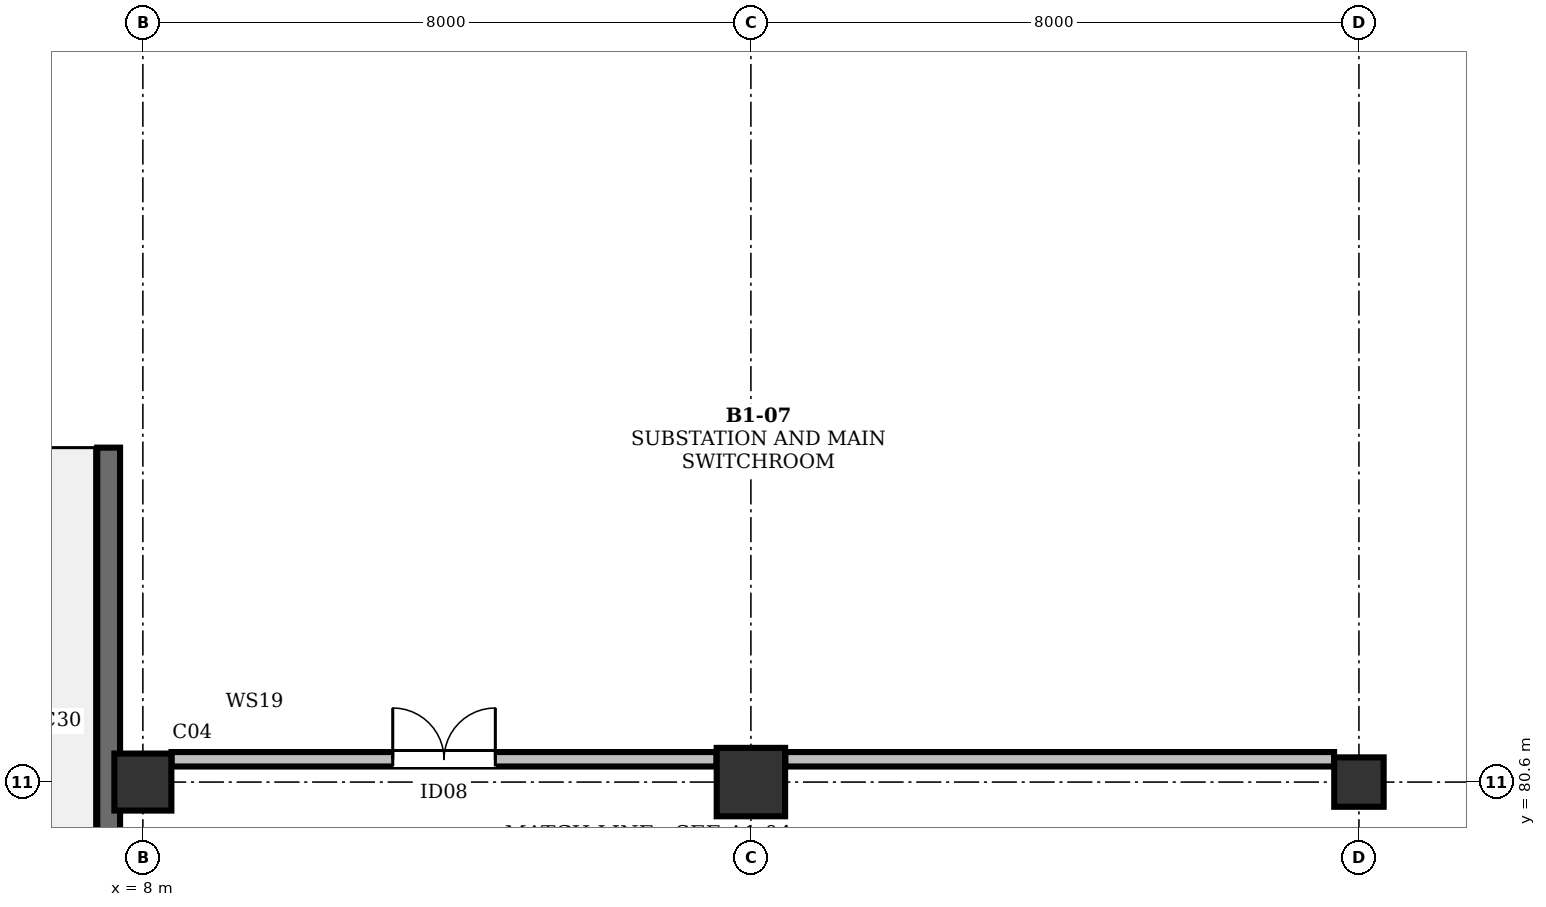
"""IFC4 building model, lengths in metres.
Left out: names, types, materials, properties, quantities, classifications, styles, units other than length and angle.
Written with IfcOpenShell. Run it as: python <this file> out.ifc"""

import sys

from ifc_helpers import new_model, si_unit, direction, frame, frame_2d, origin, origin_2d, place, context, subcontext, project, spatial, rectangle, extrude, element, fill, save


model = new_model("IFC4")
c1 = context("Model", 3, precision=1e-05, world=origin(), true_north=direction((0.0, 1.0)))
c2 = subcontext(c1, "Body", "Model", "MODEL_VIEW")
j1 = project(units=[si_unit("LENGTHUNIT", "METRE"), si_unit("PLANEANGLEUNIT", "RADIAN")], contexts=[c1])
p1 = place(None, origin())
s1 = spatial("IfcSite", under=j1, at=p1, CompositionType="ELEMENT")
p2 = place(p1, origin())
s2 = spatial("IfcBuilding", under=s1, at=p2, CompositionType="ELEMENT")
p3 = place(p2, frame((0.0, 0.0, -4.8)))
s3 = spatial("IfcBuildingStorey", under=s2, at=p3, CompositionType="ELEMENT", Elevation=-4.8)
p4 = place(p3, frame((8.0, 80.6, 0.0), z_axis=(0.0, 0.0, 1.0), x_axis=(1.0, 0.0, 0.0)))
e1 = element("IfcColumn", 1, at=p4, inside=s3, PredefinedType="COLUMN", context=c2, shape_type="SweptSolid", body=[
    extrude(rectangle(XDim=0.75, YDim=0.75, at=origin_2d()), origin(), (0.0, 0.0, 1.0), 4.8),
])
p5 = place(p3, frame((16.0, 80.6, 0.0), z_axis=(0.0, 0.0, 1.0), x_axis=(1.0, 0.0, 0.0)))
e2 = element("IfcColumn", 2, at=p5, inside=s3, PredefinedType="COLUMN", context=c2, shape_type="SweptSolid", body=[
    extrude(rectangle(XDim=0.9, YDim=0.9, at=origin_2d()), origin(), (0.0, 0.0, 1.0), 4.8),
])
p6 = place(p3, frame((24.0, 80.6, 0.0), z_axis=(0.0, 0.0, 1.0), x_axis=(1.0, 0.0, 0.0)))
e3 = element("IfcColumn", 3, at=p6, inside=s3, PredefinedType="COLUMN", context=c2, shape_type="SweptSolid", body=[
    extrude(rectangle(XDim=0.65, YDim=0.65, at=origin_2d()), origin(), (0.0, 0.0, 1.0), 4.8),
])
p7 = place(p3, frame((7.55, 46.6, 0.0), z_axis=(0.0, 0.0, 1.0), x_axis=(0.0, 1.0, 0.0)))
e4 = element("IfcWall", 4, at=p7, inside=s3, PredefinedType="SHEAR", context=c2, shape_type="SweptSolid", body=[
    extrude(rectangle(XDim=38.4, YDim=0.3, at=frame_2d((19.2, 0.0))), origin(), (0.0, 0.0, 1.0), 4.8),
])
p8 = place(p3, frame((8.377, 80.9, 0.0), z_axis=(0.0, 0.0, 1.0), x_axis=(1.0, 0.0, 0.0)))
e5 = element("IfcWall", 5, at=p8, inside=s3, PredefinedType="SOLIDWALL", context=c2, shape_type="SweptSolid", body=[
    extrude(rectangle(XDim=7.171, YDim=0.19, at=frame_2d((3.585, 0.0))), origin(), (0.0, 0.0, 1.0), 3.255),
])
p9 = place(p8, frame((2.91, 0.0, 0.0)))
e6 = element("IfcOpeningElement", 6, at=p9, cuts=e5, PredefinedType="OPENING", context=c2, shape_type="SweptSolid", body=[
    extrude(rectangle(XDim=1.35, YDim=2.2, at=frame_2d((0.675, 1.1))), frame((0.0, 0.107, 0.0), z_axis=(0.0, -1.0, 0.0), x_axis=(1.0, 0.0, 0.0)), (0.0, 0.0, 1.0), 0.214),
])
p10 = place(p3, frame((16.452, 80.9, 0.0), z_axis=(0.0, 0.0, 1.0), x_axis=(1.0, 0.0, 0.0)))
e7 = element("IfcWall", 7, at=p10, inside=s3, PredefinedType="SOLIDWALL", context=c2, shape_type="SweptSolid", body=[
    extrude(rectangle(XDim=7.221, YDim=0.19, at=frame_2d((3.611, 0.0))), origin(), (0.0, 0.0, 1.0), 3.255),
])
p11 = place(p9, origin())
e8 = element("IfcDoor", 8, at=p11, inside=s3, OperationType="DOUBLE_DOOR_SINGLE_SWING", PredefinedType="DOOR", context=c2, shape_type="SweptSolid", body=[
    extrude(rectangle(XDim=1.35, YDim=2.2, at=frame_2d((0.675, 1.1))), frame((0.0, 0.025, 0.0), z_axis=(0.0, -1.0, 0.0), x_axis=(1.0, 0.0, 0.0)), (0.0, 0.0, 1.0), 0.05),
])
fill(e6, e8)
save(model, sys.argv[1])
